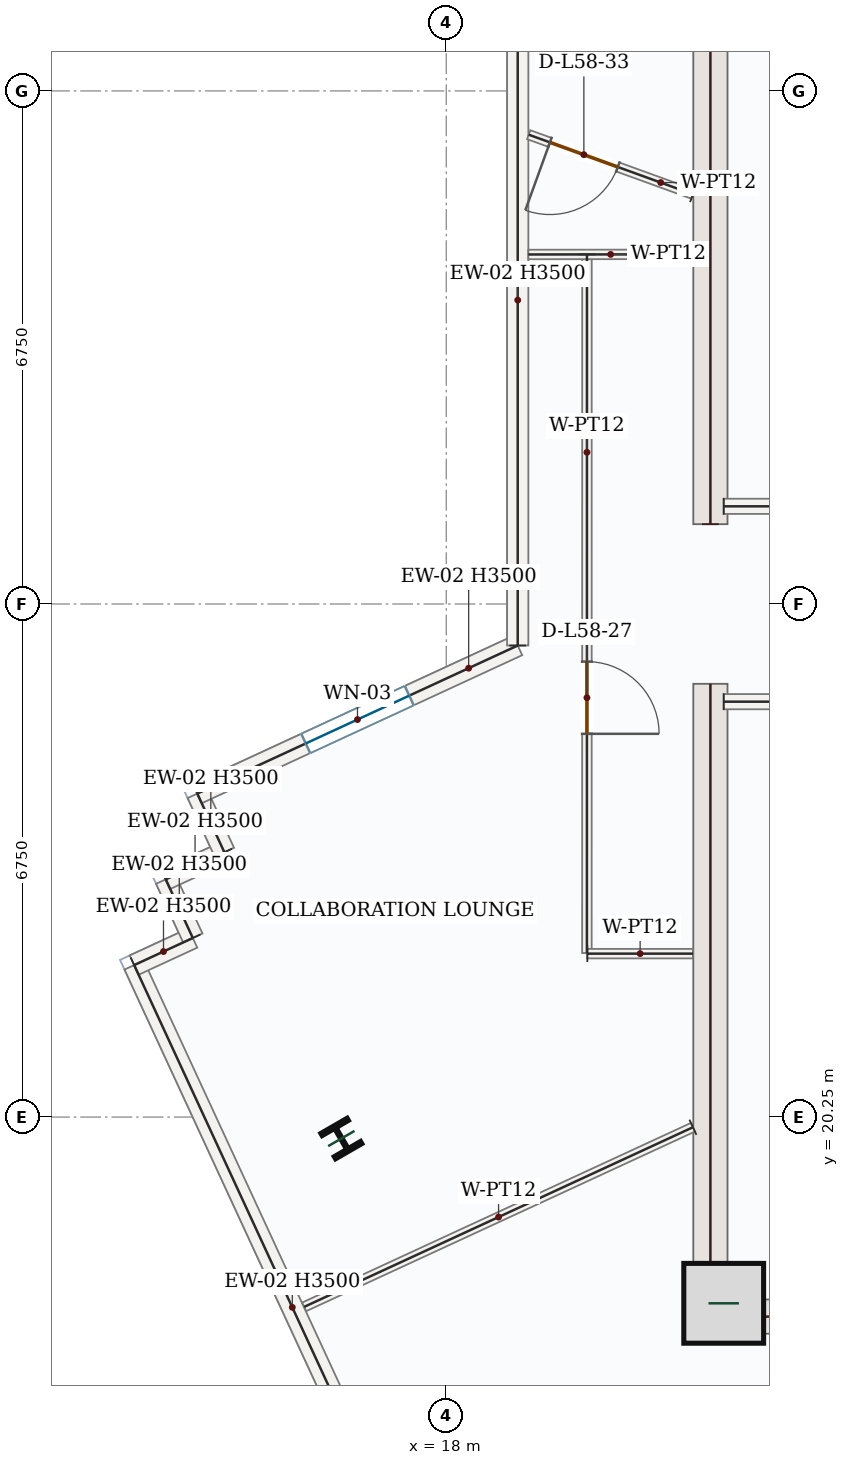
"""IFC4 building model, lengths in metres.
Left out: names, types, materials, properties, quantities, classifications, styles, units other than length and angle.
Written with IfcOpenShell. Run it as: python <this file> out.ifc"""

import sys

from ifc_helpers import new_model, si_unit, direction, frame, frame_2d, origin, origin_2d, place, context, subcontext, project, spatial, rectangle, i_section, extrude, source, transform, mapped, element, fill, save


model = new_model("IFC4")
c1 = context("Model", 3, precision=1e-05, world=origin(), true_north=direction((0.0, 1.0)))
c2 = subcontext(c1, "Body", "Model", "MODEL_VIEW")
j1 = project(units=[si_unit("LENGTHUNIT", "METRE"), si_unit("PLANEANGLEUNIT", "RADIAN")], contexts=[c1])
p1 = place(None, origin())
s1 = spatial("IfcSite", under=j1, at=p1, CompositionType="ELEMENT")
p2 = place(p1, origin())
s2 = spatial("IfcBuilding", under=s1, at=p2, CompositionType="ELEMENT")
p3 = place(p2, frame((0.0, 0.0, 246.6)))
s3 = spatial("IfcBuildingStorey", under=s2, at=p3, CompositionType="ELEMENT", Elevation=246.6)
m1 = source(origin(), c2, "Body", "SweptSolid", [
    extrude(rectangle(XDim=8.55, YDim=0.45, at=frame_2d((4.275, 0.0))), origin(), (0.0, 0.0, 1.0), 3.5),
])
for number, where, z_axis, x_axis in (
    (1, (21.475, 17.4, 0.0), (0.0, 0.0, 1.0), (0.0, 1.0, 0.0)),
    (2, (21.475, 28.05, 0.0), (0.0, 0.0, 1.0), (0.0, 1.0, 0.0)),
):
    element("IfcWall", number, at=place(p3, frame(where, z_axis=z_axis, x_axis=x_axis)), inside=s3, PredefinedType="SHEAR", context=c2, shape_type="MappedRepresentation", body=[
        mapped(m1, transform((0.0, 0.0, 0.0), x_axis=(1.0, 0.0, 0.0), y_axis=(0.0, 1.0, 0.0), z_axis=(0.0, 0.0, 1.0), scale=1.0)),
    ])
m2 = source(origin(), c2, "Body", "SweptSolid", [
    extrude(rectangle(XDim=7.1, YDim=0.45, at=frame_2d((3.55, 0.0))), origin(), (0.0, 0.0, 1.0), 3.5),
])
p4 = place(p3, frame((21.7, 17.625, 0.0), z_axis=(0.0, 0.0, 1.0), x_axis=(1.0, 0.0, 0.0)))
e3 = element("IfcWall", 3, at=p4, inside=s3, PredefinedType="SHEAR", context=c2, shape_type="MappedRepresentation", body=[
    mapped(m2, transform((0.0, 0.0, 0.0), x_axis=(1.0, 0.0, 0.0), y_axis=(0.0, 1.0, 0.0), z_axis=(0.0, 0.0, 1.0), scale=1.0)),
])
m3 = source(origin(), c2, "Body", "SweptSolid", [
    extrude(rectangle(XDim=1.05, YDim=1.05, at=origin_2d()), origin(), (0.0, 0.0, 1.0), 3.75),
])
p5 = place(p3, frame((21.65, 17.8, 0.0), z_axis=(0.0, 0.0, 1.0), x_axis=(1.0, 0.0, 0.0)))
e4 = element("IfcColumn", 4, at=p5, inside=s3, PredefinedType="COLUMN", context=c2, shape_type="MappedRepresentation", body=[
    mapped(m3, transform((0.0, 0.0, 0.0), x_axis=(1.0, 0.0, 0.0), y_axis=(0.0, 1.0, 0.0), z_axis=(0.0, 0.0, 1.0), scale=1.0)),
])
m4 = source(origin(), c2, "Body", "SweptSolid", [
    extrude(i_section(OverallWidth=0.399, OverallDepth=0.386, WebThickness=0.021, FlangeThickness=0.033, FilletRadius=0.018, at=origin_2d()), origin(), (0.0, 0.0, 1.0), 3.75),
])
p6 = place(p3, frame((16.62, 19.968, 0.0), z_axis=(0.0, 0.0, 1.0), x_axis=(0.866025403784, 0.5, 0.0)))
e5 = element("IfcColumn", 5, at=p6, inside=s3, PredefinedType="COLUMN", context=c2, shape_type="MappedRepresentation", body=[
    mapped(m4, transform((0.0, 0.0, 0.0), x_axis=(1.0, 0.0, 0.0), y_axis=(0.0, 1.0, 0.0), z_axis=(0.0, 0.0, 1.0), scale=1.0)),
])
m5 = source(origin(), c2, "Body", "SweptSolid", [
    extrude(rectangle(XDim=9.92, YDim=0.28, at=frame_2d((4.96, 0.0))), origin(), (0.0, 0.0, 1.0), 3.5),
])
p7 = place(p3, frame((18.055, 13.244, 0.0), z_axis=(0.0, 0.0, 1.0), x_axis=(-0.41946703495, 0.907770569357, 0.0)))
e6 = element("IfcWall", 6, at=p7, inside=s3, PredefinedType="SOLIDWALL", context=c2, shape_type="MappedRepresentation", body=[
    mapped(m5, transform((0.0, 0.0, 0.0), x_axis=(1.0, 0.0, 0.0), y_axis=(0.0, 1.0, 0.0), z_axis=(0.0, 0.0, 1.0), scale=1.0)),
])
m6 = source(origin(), c2, "Body", "SweptSolid", [
    extrude(rectangle(XDim=0.85, YDim=0.28, at=frame_2d((0.425, 0.0))), origin(), (0.0, 0.0, 1.0), 3.5),
])
for number, where, z_axis, x_axis in (
    (7, (13.894, 22.25, 0.0), (0.0, 0.0, 1.0), (0.908, 0.419, 0.0)),
    (8, (14.666, 22.606, 0.0), (0.0, 0.0, 1.0), (-0.419, 0.908, 0.0)),
):
    element("IfcWall", number, at=place(p3, frame(where, z_axis=z_axis, x_axis=x_axis)), inside=s3, PredefinedType="SOLIDWALL", context=c2, shape_type="MappedRepresentation", body=[
        mapped(m6, transform((0.0, 0.0, 0.0), x_axis=(1.0, 0.0, 0.0), y_axis=(0.0, 1.0, 0.0), z_axis=(0.0, 0.0, 1.0), scale=1.0)),
    ])
m7 = source(origin(), c2, "Body", "SweptSolid", [
    extrude(rectangle(XDim=0.85, YDim=0.28, at=frame_2d((0.425, 0.0))), origin(), (0.0, 0.0, 1.0), 3.5),
])
for number, where, z_axis, x_axis in (
    (9, (14.309, 23.378, 0.0), (0.0, 0.0, 1.0), (0.908, 0.419, 0.0)),
    (10, (15.081, 23.734, 0.0), (0.0, 0.0, 1.0), (-0.419, 0.908, 0.0)),
):
    element("IfcWall", number, at=place(p3, frame(where, z_axis=z_axis, x_axis=x_axis)), inside=s3, PredefinedType="SOLIDWALL", context=c2, shape_type="MappedRepresentation", body=[
        mapped(m7, transform((0.0, 0.0, 0.0), x_axis=(1.0, 0.0, 0.0), y_axis=(0.0, 1.0, 0.0), z_axis=(0.0, 0.0, 1.0), scale=1.0)),
    ])
p8 = place(p3, frame((14.724, 24.506, 0.0), z_axis=(0.0, 0.0, 1.0), x_axis=(0.907756183213, 0.419498166669, 0.0)))
e11 = element("IfcWall", 11, at=p8, inside=s3, PredefinedType="SOLIDWALL", context=c2, shape_type="SweptSolid", body=[
    extrude(rectangle(XDim=4.644, YDim=0.28, at=frame_2d((2.322, 0.0))), origin(), (0.0, 0.0, 1.0), 3.5),
])
p9 = place(p8, frame((1.572, 0.0, 0.85)))
e12 = element("IfcOpeningElement", 12, at=p9, cuts=e11, PredefinedType="OPENING", context=c2, shape_type="SweptSolid", body=[
    extrude(rectangle(XDim=1.5, YDim=1.5, at=frame_2d((0.75, 0.75))), frame((0.0, 0.15, 0.0), z_axis=(0.0, -1.0, 0.0), x_axis=(1.0, 0.0, 0.0)), (0.0, 0.0, 1.0), 0.3),
])
m8 = source(origin(), c2, "Body", "SweptSolid", [
    extrude(rectangle(XDim=9.088, YDim=0.28, at=frame_2d((4.544, 0.0))), origin(), (0.0, 0.0, 1.0), 3.5),
])
p10 = place(p3, frame((18.94, 26.454, 0.0), z_axis=(0.0, 0.0, 1.0), x_axis=(0.0, 1.0, 0.0)))
e13 = element("IfcWall", 13, at=p10, inside=s3, PredefinedType="SOLIDWALL", context=c2, shape_type="MappedRepresentation", body=[
    mapped(m8, transform((0.0, 0.0, 0.0), x_axis=(1.0, 0.0, 0.0), y_axis=(0.0, 1.0, 0.0), z_axis=(0.0, 0.0, 1.0), scale=1.0)),
])
m9 = source(origin(), c2, "Body", "SweptSolid", [
    extrude(rectangle(XDim=4.25, YDim=0.2, at=frame_2d((2.125, 0.0))), origin(), (0.0, 0.0, 1.0), 3.5),
])
for number, where, z_axis, x_axis in (
    (14, (21.65, 25.715, 0.0), (0.0, 0.0, 1.0), (1.0, 0.0, 0.0)),
    (15, (21.65, 28.285, 0.0), (0.0, 0.0, 1.0), (1.0, 0.0, 0.0)),
):
    element("IfcWall", number, at=place(p3, frame(where, z_axis=z_axis, x_axis=x_axis)), inside=s3, PredefinedType="SOLIDWALL", context=c2, shape_type="MappedRepresentation", body=[
        mapped(m9, transform((0.0, 0.0, 0.0), x_axis=(1.0, 0.0, 0.0), y_axis=(0.0, 1.0, 0.0), z_axis=(0.0, 0.0, 1.0), scale=1.0)),
    ])
p11 = place(p3, frame((21.245, 32.391, 0.0), z_axis=(0.0, 0.0, 1.0), x_axis=(-0.940115637779, 0.340855669755, 0.0)))
e16 = element("IfcWall", 16, at=p11, inside=s3, PredefinedType="PARTITIONING", context=c2, shape_type="SweptSolid", body=[
    extrude(rectangle(XDim=2.298, YDim=0.125, at=frame_2d((1.149, 0.0))), origin(), (0.0, 0.0, 1.0), 3.5),
])
p12 = place(p11, frame((1.051, 0.0, 0.0)))
e17 = element("IfcOpeningElement", 17, at=p12, cuts=e16, PredefinedType="OPENING", context=c2, shape_type="SweptSolid", body=[
    extrude(rectangle(XDim=0.95, YDim=2.15, at=frame_2d((0.475, 1.075))), frame((0.0, 0.073, 0.0), z_axis=(0.0, -1.0, 0.0), x_axis=(1.0, 0.0, 0.0)), (0.0, 0.0, 1.0), 0.145),
])
p13 = place(p3, frame((19.851, 31.599, 0.0), z_axis=(0.0, 0.0, 1.0), x_axis=(-7.9685508e-05, -0.999999996825, 0.0)))
e18 = element("IfcWall", 18, at=p13, inside=s3, PredefinedType="PARTITIONING", context=c2, shape_type="SweptSolid", body=[
    extrude(rectangle(XDim=9.191, YDim=0.125, at=frame_2d((4.596, 0.0))), origin(), (0.0, 0.0, 1.0), 3.5),
])
p14 = place(p13, frame((5.357, 0.0, 0.0)))
e19 = element("IfcOpeningElement", 19, at=p14, cuts=e18, PredefinedType="OPENING", context=c2, shape_type="SweptSolid", body=[
    extrude(rectangle(XDim=0.95, YDim=2.15, at=frame_2d((0.475, 1.075))), frame((0.0, 0.073, 0.0), z_axis=(0.0, -1.0, 0.0), x_axis=(1.0, 0.0, 0.0)), (0.0, 0.0, 1.0), 0.145),
])
m10 = source(origin(), c2, "Body", "SweptSolid", [
    extrude(rectangle(XDim=1.389, YDim=0.125, at=frame_2d((0.695, 0.0))), origin(), (0.0, 0.0, 1.0), 3.5),
])
p15 = place(p3, frame((19.856, 22.4, 0.0), z_axis=(0.0, 0.0, 1.0), x_axis=(1.0, 0.0, 0.0)))
e20 = element("IfcWall", 20, at=p15, inside=s3, PredefinedType="PARTITIONING", context=c2, shape_type="MappedRepresentation", body=[
    mapped(m10, transform((0.0, 0.0, 0.0), x_axis=(1.0, 0.0, 0.0), y_axis=(0.0, 1.0, 0.0), z_axis=(0.0, 0.0, 1.0), scale=1.0)),
])
m11 = source(origin(), c2, "Body", "SweptSolid", [
    extrude(rectangle(XDim=5.634, YDim=0.125, at=frame_2d((2.817, 0.0))), origin(), (0.0, 0.0, 1.0), 3.5),
])
p16 = place(p3, frame((21.245, 20.116, 0.0), z_axis=(0.0, 0.0, 1.0), x_axis=(-0.90777538002, -0.419456624014, 0.0)))
e21 = element("IfcWall", 21, at=p16, inside=s3, PredefinedType="PARTITIONING", context=c2, shape_type="MappedRepresentation", body=[
    mapped(m11, transform((0.0, 0.0, 0.0), x_axis=(1.0, 0.0, 0.0), y_axis=(0.0, 1.0, 0.0), z_axis=(0.0, 0.0, 1.0), scale=1.0)),
])
m12 = source(origin(), c2, "Body", "SweptSolid", [
    extrude(rectangle(XDim=2.165, YDim=0.125, at=frame_2d((1.083, 0.0))), origin(), (0.0, 0.0, 1.0), 3.5),
])
p17 = place(p3, frame((21.245, 31.6, 0.0), z_axis=(0.0, 0.0, 1.0), x_axis=(-0.999999688459, -0.000789354738, 0.0)))
e22 = element("IfcWall", 22, at=p17, inside=s3, PredefinedType="PARTITIONING", context=c2, shape_type="MappedRepresentation", body=[
    mapped(m12, transform((0.0, 0.0, 0.0), x_axis=(1.0, 0.0, 0.0), y_axis=(0.0, 1.0, 0.0), z_axis=(0.0, 0.0, 1.0), scale=1.0)),
])
m13 = source(origin(), c2, "Body", "SweptSolid", [
    extrude(rectangle(XDim=1.5, YDim=1.5, at=frame_2d((0.75, 0.75))), frame((0.0, 0.03, 0.0), z_axis=(0.0, -1.0, 0.0), x_axis=(1.0, 0.0, 0.0)), (0.0, 0.0, 1.0), 0.06),
])
p18 = place(p9, origin())
e23 = element("IfcWindow", 23, at=p18, inside=s3, PartitioningType="SINGLE_PANEL", PredefinedType="WINDOW", context=c2, shape_type="MappedRepresentation", body=[
    mapped(m13, transform((0.0, 0.0, 0.0), x_axis=(1.0, 0.0, 0.0), y_axis=(0.0, 1.0, 0.0), z_axis=(0.0, 0.0, 1.0), scale=1.0)),
])
fill(e12, e23)
m14 = source(origin(), c2, "Body", "SweptSolid", [
    extrude(rectangle(XDim=0.95, YDim=2.15, at=frame_2d((0.475, 1.075))), frame((0.0, 0.025, 0.0), z_axis=(0.0, -1.0, 0.0), x_axis=(1.0, 0.0, 0.0)), (0.0, 0.0, 1.0), 0.05),
])
p19 = place(p14, origin())
e24 = element("IfcDoor", 24, at=p19, inside=s3, OperationType="SINGLE_SWING_RIGHT", PredefinedType="DOOR", context=c2, shape_type="MappedRepresentation", body=[
    mapped(m14, transform((0.0, 0.0, 0.0), x_axis=(1.0, 0.0, 0.0), y_axis=(0.0, 1.0, 0.0), z_axis=(0.0, 0.0, 1.0), scale=1.0)),
])
fill(e19, e24)
p20 = place(p12, origin())
e25 = element("IfcDoor", 25, at=p20, inside=s3, OperationType="SINGLE_SWING_RIGHT", PredefinedType="DOOR", context=c2, shape_type="MappedRepresentation", body=[
    mapped(m14, transform((0.0, 0.0, 0.0), x_axis=(1.0, 0.0, 0.0), y_axis=(0.0, 1.0, 0.0), z_axis=(0.0, 0.0, 1.0), scale=1.0)),
])
fill(e17, e25)
save(model, sys.argv[1])
